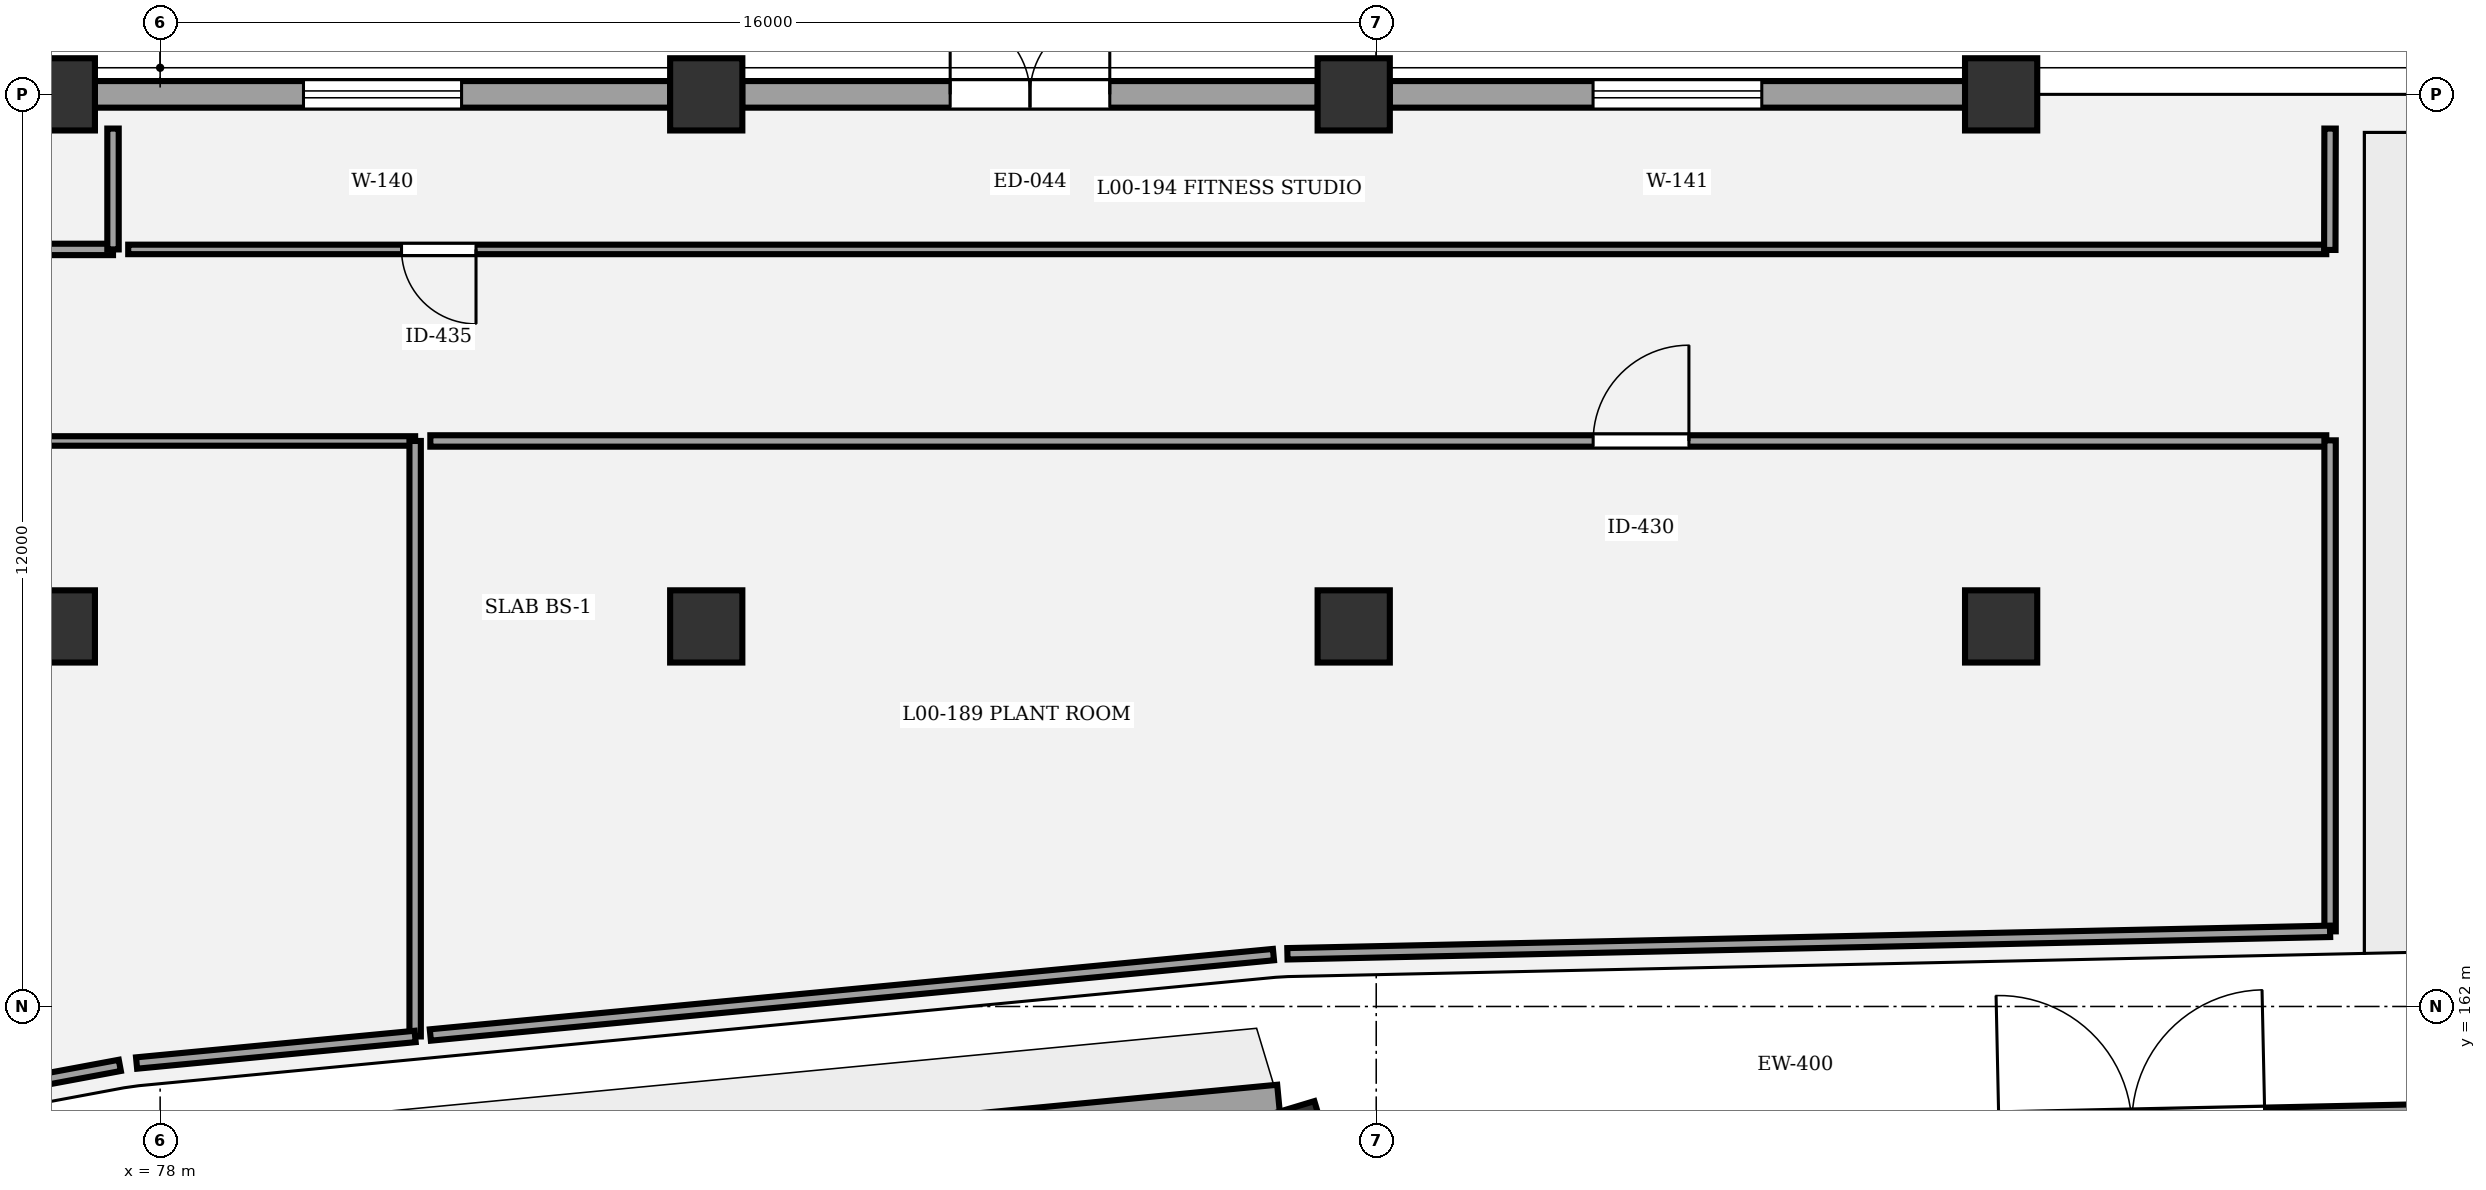
"""IFC4 building model, lengths in metres.
Left out: names, types, materials, properties, quantities, classifications, styles, units other than length and angle.
Written with IfcOpenShell. Run it as: python <this file> out.ifc"""

import sys

from ifc_helpers import new_model, si_unit, direction, frame, frame_2d, origin, origin_2d, place, context, subcontext, project, spatial, rectangle, circle, extrude, element, fill, save


model = new_model("IFC4")
c1 = context("Model", 3, precision=1e-05, world=origin(), true_north=direction((0.0, 1.0)))
c2 = subcontext(c1, "Body", "Model", "MODEL_VIEW")
j1 = project(units=[si_unit("LENGTHUNIT", "METRE"), si_unit("PLANEANGLEUNIT", "RADIAN")], contexts=[c1])
p1 = place(None, origin())
s1 = spatial("IfcSite", under=j1, at=p1, CompositionType="ELEMENT")
p2 = place(p1, origin())
s2 = spatial("IfcBuilding", under=s1, at=p2, CompositionType="ELEMENT")
p3 = place(p2, origin())
s3 = spatial("IfcBuildingStorey", under=s2, at=p3, CompositionType="ELEMENT", Elevation=0.0)
p4 = place(p3, frame((92.885, 160.194, 0.0), z_axis=(0.0, 0.0, 1.0), x_axis=(-0.289198876314, 0.957269037387, 0.0)))
e1 = element("IfcColumn", 1, at=p4, inside=s3, PredefinedType="COLUMN", context=c2, shape_type="SweptSolid", body=[
    extrude(rectangle(XDim=0.9, YDim=0.9, at=origin_2d()), origin(), (0.0, 0.0, 1.0), 5.4),
])
for number, where, z_axis, x_axis in (
    (2, (76.667, 167.0, 0.0), (0.0, 0.0, 1.0), (1.0, 0.0, 0.0)),
    (3, (76.667, 174.0, 0.0), (0.0, 0.0, 1.0), (1.0, 0.0, 0.0)),
    (4, (85.185, 167.0, 0.0), (0.0, 0.0, 1.0), (1.0, 0.0, 0.0)),
    (5, (85.185, 174.0, 0.0), (0.0, 0.0, 1.0), (1.0, 0.0, 0.0)),
    (6, (93.704, 167.0, 0.0), (0.0, 0.0, 1.0), (1.0, 0.0, 0.0)),
    (7, (93.704, 174.0, 0.0), (0.0, 0.0, 1.0), (1.0, 0.0, 0.0)),
    (8, (102.222, 167.0, 0.0), (0.0, 0.0, 1.0), (1.0, 0.0, 0.0)),
    (9, (102.222, 174.0, 0.0), (0.0, 0.0, 1.0), (1.0, 0.0, 0.0)),
):
    element("IfcColumn", number, at=place(p3, frame(where, z_axis=z_axis, x_axis=x_axis)), inside=s3, PredefinedType="COLUMN", context=c2, shape_type="SweptSolid", body=[
        extrude(circle(Radius=0.475, at=origin_2d()), origin(), (0.0, 0.0, 1.0), 5.4),
    ])
p5 = place(p3, frame((92.719, 160.746, 0.0), z_axis=(0.0, 0.0, 1.0), x_axis=(-0.995485029846, -0.09491867758, 0.0)))
e10 = element("IfcWall", 10, at=p5, inside=s3, PredefinedType="USERDEFINED", context=c2, shape_type="SweptSolid", body=[
    extrude(rectangle(XDim=15.139, YDim=0.45, at=frame_2d((7.57, 0.0))), origin(), (0.0, 0.0, 1.0), 4.25),
])
p6 = place(p3, frame((93.333, 160.203, 0.0), z_axis=(0.0, 0.0, 1.0), x_axis=(0.999768115817, 0.021534033422, 0.0)))
e11 = element("IfcWall", 11, at=p6, inside=s3, PredefinedType="STANDARD", context=c2, shape_type="SweptSolid", body=[
    extrude(rectangle(XDim=21.224, YDim=0.4, at=frame_2d((10.612, 0.0))), origin(), (0.0, 0.0, 1.0), 4.25),
])
p7 = place(p6, frame((8.862, 0.0, 0.0)))
e12 = element("IfcOpeningElement", 12, at=p7, cuts=e11, PredefinedType="OPENING", context=c2, shape_type="SweptSolid", body=[
    extrude(rectangle(XDim=3.5, YDim=3.2, at=frame_2d((1.75, 1.6))), frame((0.0, 0.21, 0.0), z_axis=(0.0, -1.0, 0.0), x_axis=(1.0, 0.0, 0.0)), (0.0, 0.0, 1.0), 0.42),
])
p8 = place(p3, frame((77.14, 174.0, 0.0), z_axis=(0.0, 0.0, 1.0), x_axis=(1.0, 0.0, 0.0)))
e13 = element("IfcWall", 13, at=p8, inside=s3, PredefinedType="STANDARD", context=c2, shape_type="SweptSolid", body=[
    extrude(rectangle(XDim=7.572, YDim=0.35, at=frame_2d((3.786, 0.0))), origin(), (0.0, 0.0, 1.0), 4.16),
])
p9 = place(p8, frame((2.746, 0.0, 0.9)))
e14 = element("IfcOpeningElement", 14, at=p9, cuts=e13, PredefinedType="OPENING", context=c2, shape_type="SweptSolid", body=[
    extrude(rectangle(XDim=2.08, YDim=1.55, at=frame_2d((1.04, 0.775))), frame((0.0, 0.185, 0.0), z_axis=(0.0, -1.0, 0.0), x_axis=(1.0, 0.0, 0.0)), (0.0, 0.0, 1.0), 0.37),
])
p10 = place(p3, frame((85.658, 174.0, 0.0), z_axis=(0.0, 0.0, 1.0), x_axis=(1.0, 0.0, 0.0)))
e15 = element("IfcWall", 15, at=p10, inside=s3, PredefinedType="STANDARD", context=c2, shape_type="SweptSolid", body=[
    extrude(rectangle(XDim=7.573, YDim=0.35, at=frame_2d((3.787, 0.0))), origin(), (0.0, 0.0, 1.0), 4.16),
])
p11 = place(p10, frame((2.737, 0.0, 0.0)))
e16 = element("IfcOpeningElement", 16, at=p11, cuts=e15, PredefinedType="OPENING", context=c2, shape_type="SweptSolid", body=[
    extrude(rectangle(XDim=2.1, YDim=2.45, at=frame_2d((1.05, 1.225))), frame((0.0, 0.185, 0.0), z_axis=(0.0, -1.0, 0.0), x_axis=(1.0, 0.0, 0.0)), (0.0, 0.0, 1.0), 0.37),
])
p12 = place(p3, frame((94.177, 174.0, 0.0), z_axis=(0.0, 0.0, 1.0), x_axis=(1.0, 0.0, 0.0)))
e17 = element("IfcWall", 17, at=p12, inside=s3, PredefinedType="STANDARD", context=c2, shape_type="SweptSolid", body=[
    extrude(rectangle(XDim=7.572, YDim=0.35, at=frame_2d((3.786, 0.0))), origin(), (0.0, 0.0, 1.0), 4.16),
])
p13 = place(p12, frame((2.676, 0.0, 0.9)))
e18 = element("IfcOpeningElement", 18, at=p13, cuts=e17, PredefinedType="OPENING", context=c2, shape_type="SweptSolid", body=[
    extrude(rectangle(XDim=2.22, YDim=1.55, at=frame_2d((1.11, 0.775))), frame((0.0, 0.185, 0.0), z_axis=(0.0, -1.0, 0.0), x_axis=(1.0, 0.0, 0.0)), (0.0, 0.0, 1.0), 0.37),
])
p14 = place(p3, frame((56.36, 169.44, 0.0), z_axis=(0.0, 0.0, 1.0), x_axis=(1.0, 0.0, 0.0)))
e19 = element("IfcWall", 19, at=p14, inside=s3, PredefinedType="PARTITIONING", context=c2, shape_type="SweptSolid", body=[
    extrude(rectangle(XDim=24.995, YDim=0.125, at=frame_2d((12.498, 0.0))), origin(), (0.0, 0.0, 1.0), 4.15),
])
p15 = place(p14, frame((15.358, 0.0, 0.0)))
e20 = element("IfcOpeningElement", 20, at=p15, cuts=e19, PredefinedType="OPENING", context=c2, shape_type="SweptSolid", body=[
    extrude(rectangle(XDim=1.22, YDim=2.3, at=frame_2d((0.61, 1.15))), frame((0.0, 0.073, 0.0), z_axis=(0.0, -1.0, 0.0), x_axis=(1.0, 0.0, 0.0)), (0.0, 0.0, 1.0), 0.145),
])
p16 = place(p3, frame((81.555, 169.44, 0.0), z_axis=(0.0, 0.0, 1.0), x_axis=(1.0, 0.0, 0.0)))
e21 = element("IfcWall", 21, at=p16, inside=s3, PredefinedType="PARTITIONING", context=c2, shape_type="SweptSolid", body=[
    extrude(rectangle(XDim=24.945, YDim=0.15, at=frame_2d((12.473, 0.0))), origin(), (0.0, 0.0, 1.0), 4.15),
])
p17 = place(p16, frame((15.299, 0.0, 0.0)))
e22 = element("IfcOpeningElement", 22, at=p17, cuts=e21, PredefinedType="OPENING", context=c2, shape_type="SweptSolid", body=[
    extrude(rectangle(XDim=1.26, YDim=2.3, at=frame_2d((0.63, 1.15))), frame((0.0, 0.085, 0.0), z_axis=(0.0, -1.0, 0.0), x_axis=(1.0, 0.0, 0.0)), (0.0, 0.0, 1.0), 0.17),
])
p18 = place(p3, frame((77.38, 171.96, 0.0), z_axis=(0.0, 0.0, 1.0), x_axis=(-1.0, 0.0, 0.0)))
e23 = element("IfcWall", 23, at=p18, inside=s3, PredefinedType="PARTITIONING", context=c2, shape_type="SweptSolid", body=[
    extrude(rectangle(XDim=23.48, YDim=0.15, at=frame_2d((11.74, 0.0))), origin(), (0.0, 0.0, 1.0), 4.15),
])
p19 = place(p18, frame((4.7, 0.0, 0.0)))
e24 = element("IfcOpeningElement", 24, at=p19, cuts=e23, PredefinedType="OPENING", context=c2, shape_type="SweptSolid", body=[
    extrude(rectangle(XDim=0.94, YDim=2.1, at=frame_2d((0.47, 1.05))), frame((0.0, 0.085, 0.0), z_axis=(0.0, -1.0, 0.0), x_axis=(1.0, 0.0, 0.0)), (0.0, 0.0, 1.0), 0.17),
])
p20 = place(p3, frame((106.5, 171.96, 0.0), z_axis=(0.0, 0.0, 1.0), x_axis=(-1.0, 0.0, 0.0)))
e25 = element("IfcWall", 25, at=p20, inside=s3, PredefinedType="PARTITIONING", context=c2, shape_type="SweptSolid", body=[
    extrude(rectangle(XDim=28.92, YDim=0.125, at=frame_2d((14.46, 0.0))), origin(), (0.0, 0.0, 1.0), 4.15),
])
p21 = place(p20, frame((24.344, 0.0, 0.0)))
e26 = element("IfcOpeningElement", 26, at=p21, cuts=e25, PredefinedType="OPENING", context=c2, shape_type="SweptSolid", body=[
    extrude(rectangle(XDim=0.98, YDim=2.1, at=frame_2d((0.49, 1.05))), frame((0.0, 0.073, 0.0), z_axis=(0.0, -1.0, 0.0), x_axis=(1.0, 0.0, 0.0)), (0.0, 0.0, 1.0), 0.145),
])
p22 = place(p3, frame((77.469, 161.225, 0.0), z_axis=(0.0, 0.0, 1.0), x_axis=(-0.983094545276, -0.183098648406, 0.0)))
e27 = element("IfcWall", 27, at=p22, inside=s3, PredefinedType="PARTITIONING", context=c2, shape_type="SweptSolid", body=[
    extrude(rectangle(XDim=12.947, YDim=0.15, at=frame_2d((6.474, 0.0))), origin(), (0.0, 0.0, 1.0), 4.15),
])
p23 = place(p3, frame((81.355, 169.44, 0.0), z_axis=(0.0, 0.0, 1.0), x_axis=(0.0, -1.0, 0.0)))
e28 = element("IfcWall", 28, at=p23, inside=s3, PredefinedType="PARTITIONING", context=c2, shape_type="SweptSolid", body=[
    extrude(rectangle(XDim=7.834, YDim=0.15, at=frame_2d((3.917, 0.0))), origin(), (0.0, 0.0, 1.0), 4.15),
])
p24 = place(p3, frame((81.355, 161.606, 0.0), z_axis=(0.0, 0.0, 1.0), x_axis=(-0.995481155674, -0.094959300221, 0.0)))
e29 = element("IfcWall", 29, at=p24, inside=s3, PredefinedType="PARTITIONING", context=c2, shape_type="SweptSolid", body=[
    extrude(rectangle(XDim=3.682, YDim=0.15, at=frame_2d((1.841, 0.0))), origin(), (0.0, 0.0, 1.0), 4.15),
])
p25 = place(p3, frame((92.648, 162.683, 0.0), z_axis=(0.0, 0.0, 1.0), x_axis=(-0.995483944756, -0.094930057059, 0.0)))
e30 = element("IfcWall", 30, at=p25, inside=s3, PredefinedType="PARTITIONING", context=c2, shape_type="SweptSolid", body=[
    extrude(rectangle(XDim=11.144, YDim=0.15, at=frame_2d((5.572, 0.0))), origin(), (0.0, 0.0, 1.0), 4.15),
])
p26 = place(p3, frame((106.55, 169.448, 0.0), z_axis=(0.0, 0.0, 1.0), x_axis=(0.0, -1.0, 0.0)))
e31 = element("IfcWall", 31, at=p26, inside=s3, PredefinedType="PARTITIONING", context=c2, shape_type="SweptSolid", body=[
    extrude(rectangle(XDim=6.46, YDim=0.15, at=frame_2d((3.23, 0.0))), origin(), (0.0, 0.0, 1.0), 4.15),
])
p27 = place(p3, frame((106.55, 162.989, 0.0), z_axis=(0.0, 0.0, 1.0), x_axis=(-0.999768230535, -0.021528706714, 0.0)))
e32 = element("IfcWall", 32, at=p27, inside=s3, PredefinedType="PARTITIONING", context=c2, shape_type="SweptSolid", body=[
    extrude(rectangle(XDim=13.722, YDim=0.15, at=frame_2d((6.861, 0.0))), origin(), (0.0, 0.0, 1.0), 4.15),
])
p28 = place(p3, frame((77.38, 173.55, 0.0), z_axis=(0.0, 0.0, 1.0), x_axis=(0.0, -1.0, 0.0)))
e33 = element("IfcWall", 33, at=p28, inside=s3, PredefinedType="PARTITIONING", context=c2, shape_type="SweptSolid", body=[
    extrude(rectangle(XDim=1.59, YDim=0.15, at=frame_2d((0.795, 0.0))), origin(), (0.0, 0.0, 1.0), 4.15),
])
p29 = place(p3, frame((106.55, 173.55, 0.0), z_axis=(0.0, 0.0, 1.0), x_axis=(-0.002293221305, -0.999997370565, 0.0)))
e34 = element("IfcWall", 34, at=p29, inside=s3, PredefinedType="PARTITIONING", context=c2, shape_type="SweptSolid", body=[
    extrude(rectangle(XDim=1.597, YDim=0.15, at=frame_2d((0.798, 0.0))), origin(), (0.0, 0.0, 1.0), 4.15),
])
p30 = place(p9, origin())
e35 = element("IfcWindow", 35, at=p30, inside=s3, PartitioningType="SINGLE_PANEL", PredefinedType="WINDOW", context=c2, shape_type="SweptSolid", body=[
    extrude(rectangle(XDim=2.08, YDim=1.55, at=frame_2d((1.04, 0.775))), frame((0.0, 0.03, 0.0), z_axis=(0.0, -1.0, 0.0), x_axis=(1.0, 0.0, 0.0)), (0.0, 0.0, 1.0), 0.06),
])
fill(e14, e35)
p31 = place(p11, origin())
e36 = element("IfcDoor", 36, at=p31, inside=s3, OperationType="DOUBLE_DOOR_SINGLE_SWING", PredefinedType="DOOR", context=c2, shape_type="SweptSolid", body=[
    extrude(rectangle(XDim=2.1, YDim=2.45, at=frame_2d((1.05, 1.225))), frame((0.0, 0.025, 0.0), z_axis=(0.0, -1.0, 0.0), x_axis=(1.0, 0.0, 0.0)), (0.0, 0.0, 1.0), 0.05),
])
fill(e16, e36)
p32 = place(p13, origin())
e37 = element("IfcWindow", 37, at=p32, inside=s3, PartitioningType="SINGLE_PANEL", PredefinedType="WINDOW", context=c2, shape_type="SweptSolid", body=[
    extrude(rectangle(XDim=2.22, YDim=1.55, at=frame_2d((1.11, 0.775))), frame((0.0, 0.03, 0.0), z_axis=(0.0, -1.0, 0.0), x_axis=(1.0, 0.0, 0.0)), (0.0, 0.0, 1.0), 0.06),
])
fill(e18, e37)
p33 = place(p17, origin())
e38 = element("IfcDoor", 38, at=p33, inside=s3, OperationType="SINGLE_SWING_RIGHT", PredefinedType="DOOR", context=c2, shape_type="SweptSolid", body=[
    extrude(rectangle(XDim=1.26, YDim=2.3, at=frame_2d((0.63, 1.15))), frame((0.0, 0.025, 0.0), z_axis=(0.0, -1.0, 0.0), x_axis=(1.0, 0.0, 0.0)), (0.0, 0.0, 1.0), 0.05),
])
fill(e22, e38)
p34 = place(p21, origin())
e39 = element("IfcDoor", 39, at=p34, inside=s3, OperationType="SINGLE_SWING_LEFT", PredefinedType="DOOR", context=c2, shape_type="SweptSolid", body=[
    extrude(rectangle(XDim=0.98, YDim=2.1, at=frame_2d((0.49, 1.05))), frame((0.0, 0.025, 0.0), z_axis=(0.0, -1.0, 0.0), x_axis=(1.0, 0.0, 0.0)), (0.0, 0.0, 1.0), 0.05),
])
fill(e26, e39)
save(model, sys.argv[1])
